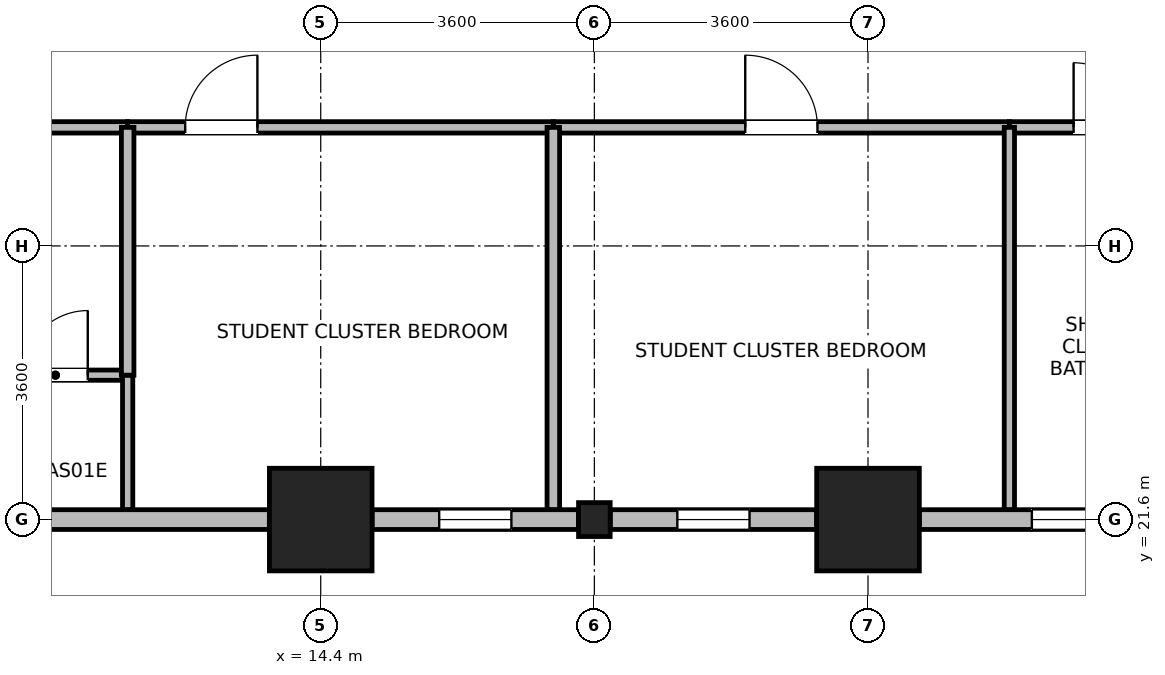
"""IFC4 building model, lengths in metres.
Left out: names, types, materials, properties, quantities, classifications, styles, units other than length and angle.
Written with IfcOpenShell. Run it as: python <this file> out.ifc"""

import sys

from ifc_helpers import new_model, si_unit, direction, frame, frame_2d, origin, origin_2d, place, context, subcontext, project, spatial, rectangle, i_section, extrude, source, transform, mapped, element, fill, save


model = new_model("IFC4")
c1 = context("Model", 3, precision=1e-05, world=origin(), true_north=direction((0.0, 1.0)))
c2 = subcontext(c1, "Body", "Model", "MODEL_VIEW")
j1 = project(units=[si_unit("LENGTHUNIT", "METRE"), si_unit("PLANEANGLEUNIT", "RADIAN")], contexts=[c1])
p1 = place(None, origin())
s1 = spatial("IfcSite", under=j1, at=p1, CompositionType="ELEMENT")
p2 = place(p1, origin())
s2 = spatial("IfcBuilding", under=s1, at=p2, CompositionType="ELEMENT")
p3 = place(p2, frame((0.0, 0.0, 62.3)))
s3 = spatial("IfcBuildingStorey", under=s2, at=p3, CompositionType="ELEMENT", Elevation=62.3)
m1 = source(origin(), c2, "Body", "SweptSolid", [
    extrude(rectangle(XDim=1.35, YDim=1.35, at=origin_2d()), origin(), (0.0, 0.0, 1.0), 3.7),
])
for number, where, z_axis, x_axis in (
    (1, (14.4, 21.6, 0.0), (0.0, 0.0, 1.0), (1.0, 0.0, 0.0)),
    (2, (21.6, 21.6, 0.0), (0.0, 0.0, 1.0), (1.0, 0.0, 0.0)),
):
    element("IfcColumn", number, at=place(p3, frame(where, z_axis=z_axis, x_axis=x_axis)), inside=s3, PredefinedType="COLUMN", context=c2, shape_type="MappedRepresentation", body=[
        mapped(m1, transform((0.0, 0.0, 0.0), x_axis=(1.0, 0.0, 0.0), y_axis=(0.0, 1.0, 0.0), z_axis=(0.0, 0.0, 1.0), scale=1.0)),
    ])
m2 = source(origin(), c2, "Body", "SweptSolid", [
    extrude(i_section(OverallWidth=0.416, OverallDepth=0.446, WebThickness=0.029, FlangeThickness=0.04, FilletRadius=0.015, at=origin_2d()), origin(), (0.0, 0.0, 1.0), 3.7),
])
p4 = place(p3, frame((18.0, 21.6, 0.0), z_axis=(0.0, 0.0, 1.0), x_axis=(1.0, 0.0, 0.0)))
e3 = element("IfcColumn", 3, at=p4, inside=s3, PredefinedType="COLUMN", context=c2, shape_type="MappedRepresentation", body=[
    mapped(m2, transform((0.0, 0.0, 0.0), x_axis=(1.0, 0.0, 0.0), y_axis=(0.0, 1.0, 0.0), z_axis=(0.0, 0.0, 1.0), scale=1.0)),
])
p5 = place(p3, frame((13.724, 21.6, 0.0), z_axis=(0.0, 0.0, 1.0), x_axis=(-1.0, 0.0, 0.0)))
e4 = element("IfcWall", 4, at=p5, inside=s3, PredefinedType="STANDARD", context=c2, shape_type="SweptSolid", body=[
    extrude(rectangle(XDim=10.087, YDim=0.26, at=frame_2d((5.043, 0.0))), origin(), (0.0, 0.0, 1.0), 3.43),
])
p6 = place(p5, frame((4.293, 0.0, 0.85)))
e5 = element("IfcOpeningElement", 5, at=p6, cuts=e4, PredefinedType="OPENING", context=c2, shape_type="SweptSolid", body=[
    extrude(rectangle(XDim=1.5, YDim=1.85, at=frame_2d((0.75, 0.925))), frame((0.0, 0.14, 0.0), z_axis=(0.0, -1.0, 0.0), x_axis=(1.0, 0.0, 0.0)), (0.0, 0.0, 1.0), 0.28),
])
p7 = place(p5, frame((7.656, 0.0, 0.85)))
e6 = element("IfcOpeningElement", 6, at=p7, cuts=e4, PredefinedType="OPENING", context=c2, shape_type="SweptSolid", body=[
    extrude(rectangle(XDim=1.5, YDim=1.85, at=frame_2d((0.75, 0.925))), frame((0.0, 0.14, 0.0), z_axis=(0.0, -1.0, 0.0), x_axis=(1.0, 0.0, 0.0)), (0.0, 0.0, 1.0), 0.28),
])
p8 = place(p3, frame((17.791, 21.6, 0.0), z_axis=(0.0, 0.0, 1.0), x_axis=(-1.0, 0.0, 0.0)))
e7 = element("IfcWall", 7, at=p8, inside=s3, PredefinedType="STANDARD", context=c2, shape_type="SweptSolid", body=[
    extrude(rectangle(XDim=2.715, YDim=0.26, at=frame_2d((1.357, 0.0))), origin(), (0.0, 0.0, 1.0), 2.93),
])
p9 = place(p8, frame((0.883, 0.0, 0.85)))
e8 = element("IfcOpeningElement", 8, at=p9, cuts=e7, PredefinedType="OPENING", context=c2, shape_type="SweptSolid", body=[
    extrude(rectangle(XDim=0.95, YDim=1.75, at=frame_2d((0.475, 0.875))), frame((0.0, 0.14, 0.0), z_axis=(0.0, -1.0, 0.0), x_axis=(1.0, 0.0, 0.0)), (0.0, 0.0, 1.0), 0.28),
])
p10 = place(p3, frame((20.924, 21.6, 0.0), z_axis=(0.0, 0.0, 1.0), x_axis=(-1.0, 0.0, 0.0)))
e9 = element("IfcWall", 9, at=p10, inside=s3, PredefinedType="STANDARD", context=c2, shape_type="SweptSolid", body=[
    extrude(rectangle(XDim=2.715, YDim=0.26, at=frame_2d((1.357, 0.0))), origin(), (0.0, 0.0, 1.0), 2.93),
])
p11 = place(p10, frame((0.883, 0.0, 0.85)))
e10 = element("IfcOpeningElement", 10, at=p11, cuts=e9, PredefinedType="OPENING", context=c2, shape_type="SweptSolid", body=[
    extrude(rectangle(XDim=0.95, YDim=1.75, at=frame_2d((0.475, 0.875))), frame((0.0, 0.14, 0.0), z_axis=(0.0, -1.0, 0.0), x_axis=(1.0, 0.0, 0.0)), (0.0, 0.0, 1.0), 0.28),
])
p12 = place(p3, frame((24.991, 21.6, 0.0), z_axis=(0.0, 0.0, 1.0), x_axis=(-1.0, 0.0, 0.0)))
e11 = element("IfcWall", 11, at=p12, inside=s3, PredefinedType="STANDARD", context=c2, shape_type="SweptSolid", body=[
    extrude(rectangle(XDim=2.715, YDim=0.26, at=frame_2d((1.357, 0.0))), origin(), (0.0, 0.0, 1.0), 2.93),
])
p13 = place(p12, frame((0.285, 0.0, 0.85)))
e12 = element("IfcOpeningElement", 12, at=p13, cuts=e11, PredefinedType="OPENING", context=c2, shape_type="SweptSolid", body=[
    extrude(rectangle(XDim=0.95, YDim=1.75, at=frame_2d((0.475, 0.875))), frame((0.0, 0.14, 0.0), z_axis=(0.0, -1.0, 0.0), x_axis=(1.0, 0.0, 0.0)), (0.0, 0.0, 1.0), 0.28),
])
p14 = place(p3, frame((9.96, 23.5, 0.0), z_axis=(0.0, 0.0, 1.0), x_axis=(1.0, 0.0, 0.0)))
e13 = element("IfcWall", 13, at=p14, inside=s3, PredefinedType="PARTITIONING", context=c2, shape_type="SweptSolid", body=[
    extrude(rectangle(XDim=1.9, YDim=0.135, at=frame_2d((0.95, 0.0))), origin(), (0.0, 0.0, 1.0), 3.43),
])
p15 = place(p14, frame((0.525, 0.0, 0.0)))
e14 = element("IfcOpeningElement", 14, at=p15, cuts=e13, PredefinedType="OPENING", context=c2, shape_type="SweptSolid", body=[
    extrude(rectangle(XDim=0.85, YDim=2.04, at=frame_2d((0.425, 1.02))), frame((0.0, 0.078, 0.0), z_axis=(0.0, -1.0, 0.0), x_axis=(1.0, 0.0, 0.0)), (0.0, 0.0, 1.0), 0.155),
])
p16 = place(p3, frame((11.86, 21.732, 0.0), z_axis=(0.0, 0.0, 1.0), x_axis=(0.0, 1.0, 0.0)))
e15 = element("IfcWall", 15, at=p16, inside=s3, PredefinedType="PARTITIONING", context=c2, shape_type="SweptSolid", body=[
    extrude(rectangle(XDim=1.768, YDim=0.135, at=frame_2d((0.884, 0.0))), origin(), (0.0, 0.0, 1.0), 3.43),
])
p17 = place(p3, frame((3.62, 26.76, 0.0), z_axis=(0.0, 0.0, 1.0), x_axis=(1.0, 0.0, 0.0)))
e16 = element("IfcWall", 16, at=p17, inside=s3, PredefinedType="PARTITIONING", context=c2, shape_type="SweptSolid", body=[
    extrude(rectangle(XDim=8.24, YDim=0.15, at=frame_2d((4.12, 0.0))), origin(), (0.0, 0.0, 1.0), 3.43),
])
p18 = place(p17, frame((4.469, 0.0, 0.0)))
e17 = element("IfcOpeningElement", 17, at=p18, cuts=e16, PredefinedType="OPENING", context=c2, shape_type="SweptSolid", body=[
    extrude(rectangle(XDim=0.95, YDim=2.1, at=frame_2d((0.475, 1.05))), frame((0.0, 0.085, 0.0), z_axis=(0.0, -1.0, 0.0), x_axis=(1.0, 0.0, 0.0)), (0.0, 0.0, 1.0), 0.17),
])
p19 = place(p3, frame((17.46, 26.76, 0.0), z_axis=(0.0, 0.0, 1.0), x_axis=(1.0, 0.0, 0.0)))
e18 = element("IfcWall", 18, at=p19, inside=s3, PredefinedType="PARTITIONING", context=c2, shape_type="SweptSolid", body=[
    extrude(rectangle(XDim=6.0, YDim=0.15, at=frame_2d((3.0, 0.0))), origin(), (0.0, 0.0, 1.0), 3.43),
])
p20 = place(p19, frame((2.525, 0.0, 0.0)))
e19 = element("IfcOpeningElement", 19, at=p20, cuts=e18, PredefinedType="OPENING", context=c2, shape_type="SweptSolid", body=[
    extrude(rectangle(XDim=0.95, YDim=2.1, at=frame_2d((0.475, 1.05))), frame((0.0, 0.085, 0.0), z_axis=(0.0, -1.0, 0.0), x_axis=(1.0, 0.0, 0.0)), (0.0, 0.0, 1.0), 0.17),
])
p21 = place(p3, frame((11.86, 26.76, 0.0), z_axis=(0.0, 0.0, 1.0), x_axis=(1.0, 0.0, 0.0)))
e20 = element("IfcWall", 20, at=p21, inside=s3, PredefinedType="PARTITIONING", context=c2, shape_type="SweptSolid", body=[
    extrude(rectangle(XDim=5.6, YDim=0.15, at=frame_2d((2.8, 0.0))), origin(), (0.0, 0.0, 1.0), 3.43),
])
p22 = place(p21, frame((0.757, 0.0, 0.0)))
e21 = element("IfcOpeningElement", 21, at=p22, cuts=e20, PredefinedType="OPENING", context=c2, shape_type="SweptSolid", body=[
    extrude(rectangle(XDim=0.95, YDim=2.1, at=frame_2d((0.475, 1.05))), frame((0.0, 0.085, 0.0), z_axis=(0.0, -1.0, 0.0), x_axis=(1.0, 0.0, 0.0)), (0.0, 0.0, 1.0), 0.17),
])
p23 = place(p3, frame((23.46, 26.76, 0.0), z_axis=(0.0, 0.0, 1.0), x_axis=(1.0, 0.0, 0.0)))
e22 = element("IfcWall", 22, at=p23, inside=s3, PredefinedType="PARTITIONING", context=c2, shape_type="SweptSolid", body=[
    extrude(rectangle(XDim=2.54, YDim=0.15, at=frame_2d((1.27, 0.0))), origin(), (0.0, 0.0, 1.0), 3.43),
])
p24 = place(p23, frame((0.845, 0.0, 0.0)))
e23 = element("IfcOpeningElement", 23, at=p24, cuts=e22, PredefinedType="OPENING", context=c2, shape_type="SweptSolid", body=[
    extrude(rectangle(XDim=0.85, YDim=2.04, at=frame_2d((0.425, 1.02))), frame((0.0, 0.085, 0.0), z_axis=(0.0, -1.0, 0.0), x_axis=(1.0, 0.0, 0.0)), (0.0, 0.0, 1.0), 0.17),
])
p25 = place(p3, frame((17.46, 21.732, 0.0), z_axis=(0.0, 0.0, 1.0), x_axis=(0.0, 1.0, 0.0)))
e24 = element("IfcWall", 24, at=p25, inside=s3, PredefinedType="PARTITIONING", context=c2, shape_type="SweptSolid", body=[
    extrude(rectangle(XDim=5.028, YDim=0.165, at=frame_2d((2.514, 0.0))), origin(), (0.0, 0.0, 1.0), 3.43),
])
p26 = place(p3, frame((23.46, 21.732, 0.0), z_axis=(0.0, 0.0, 1.0), x_axis=(0.0, 1.0, 0.0)))
e25 = element("IfcWall", 25, at=p26, inside=s3, PredefinedType="PARTITIONING", context=c2, shape_type="SweptSolid", body=[
    extrude(rectangle(XDim=5.028, YDim=0.135, at=frame_2d((2.514, 0.0))), origin(), (0.0, 0.0, 1.0), 3.43),
])
p27 = place(p3, frame((11.86, 23.5, 0.0), z_axis=(0.0, 0.0, 1.0), x_axis=(0.0, 1.0, 0.0)))
e26 = element("IfcWall", 26, at=p27, inside=s3, PredefinedType="PARTITIONING", context=c2, shape_type="SweptSolid", body=[
    extrude(rectangle(XDim=3.26, YDim=0.165, at=frame_2d((1.63, 0.0))), origin(), (0.0, 0.0, 1.0), 3.43),
])
p28 = place(p9, origin())
e27 = element("IfcWindow", 27, at=p28, inside=s3, PartitioningType="SINGLE_PANEL", PredefinedType="WINDOW", context=c2, shape_type="SweptSolid", body=[
    extrude(rectangle(XDim=0.95, YDim=1.75, at=frame_2d((0.475, 0.875))), frame((0.0, 0.03, 0.0), z_axis=(0.0, -1.0, 0.0), x_axis=(1.0, 0.0, 0.0)), (0.0, 0.0, 1.0), 0.06),
])
fill(e8, e27)
p29 = place(p11, origin())
e28 = element("IfcWindow", 28, at=p29, inside=s3, PartitioningType="SINGLE_PANEL", PredefinedType="WINDOW", context=c2, shape_type="SweptSolid", body=[
    extrude(rectangle(XDim=0.95, YDim=1.75, at=frame_2d((0.475, 0.875))), frame((0.0, 0.03, 0.0), z_axis=(0.0, -1.0, 0.0), x_axis=(1.0, 0.0, 0.0)), (0.0, 0.0, 1.0), 0.06),
])
fill(e10, e28)
p30 = place(p13, origin())
e29 = element("IfcWindow", 29, at=p30, inside=s3, PartitioningType="SINGLE_PANEL", PredefinedType="WINDOW", context=c2, shape_type="SweptSolid", body=[
    extrude(rectangle(XDim=0.95, YDim=1.75, at=frame_2d((0.475, 0.875))), frame((0.0, 0.03, 0.0), z_axis=(0.0, -1.0, 0.0), x_axis=(1.0, 0.0, 0.0)), (0.0, 0.0, 1.0), 0.06),
])
fill(e12, e29)
p31 = place(p15, origin())
e30 = element("IfcDoor", 30, at=p31, inside=s3, OperationType="SINGLE_SWING_RIGHT", PredefinedType="DOOR", context=c2, shape_type="SweptSolid", body=[
    extrude(rectangle(XDim=0.85, YDim=2.04, at=frame_2d((0.425, 1.02))), frame((0.0, 0.025, 0.0), z_axis=(0.0, -1.0, 0.0), x_axis=(1.0, 0.0, 0.0)), (0.0, 0.0, 1.0), 0.05),
])
fill(e14, e30)
p32 = place(p20, origin())
e31 = element("IfcDoor", 31, at=p32, inside=s3, OperationType="SINGLE_SWING_LEFT", PredefinedType="DOOR", context=c2, shape_type="SweptSolid", body=[
    extrude(rectangle(XDim=0.95, YDim=2.1, at=frame_2d((0.475, 1.05))), frame((0.0, 0.025, 0.0), z_axis=(0.0, -1.0, 0.0), x_axis=(1.0, 0.0, 0.0)), (0.0, 0.0, 1.0), 0.05),
])
fill(e19, e31)
p33 = place(p22, origin())
e32 = element("IfcDoor", 32, at=p33, inside=s3, OperationType="SINGLE_SWING_RIGHT", PredefinedType="DOOR", context=c2, shape_type="SweptSolid", body=[
    extrude(rectangle(XDim=0.95, YDim=2.1, at=frame_2d((0.475, 1.05))), frame((0.0, 0.025, 0.0), z_axis=(0.0, -1.0, 0.0), x_axis=(1.0, 0.0, 0.0)), (0.0, 0.0, 1.0), 0.05),
])
fill(e21, e32)
p34 = place(p24, origin())
e33 = element("IfcDoor", 33, at=p34, inside=s3, OperationType="SINGLE_SWING_LEFT", PredefinedType="DOOR", context=c2, shape_type="SweptSolid", body=[
    extrude(rectangle(XDim=0.85, YDim=2.04, at=frame_2d((0.425, 1.02))), frame((0.0, 0.025, 0.0), z_axis=(0.0, -1.0, 0.0), x_axis=(1.0, 0.0, 0.0)), (0.0, 0.0, 1.0), 0.05),
])
fill(e23, e33)
save(model, sys.argv[1])
